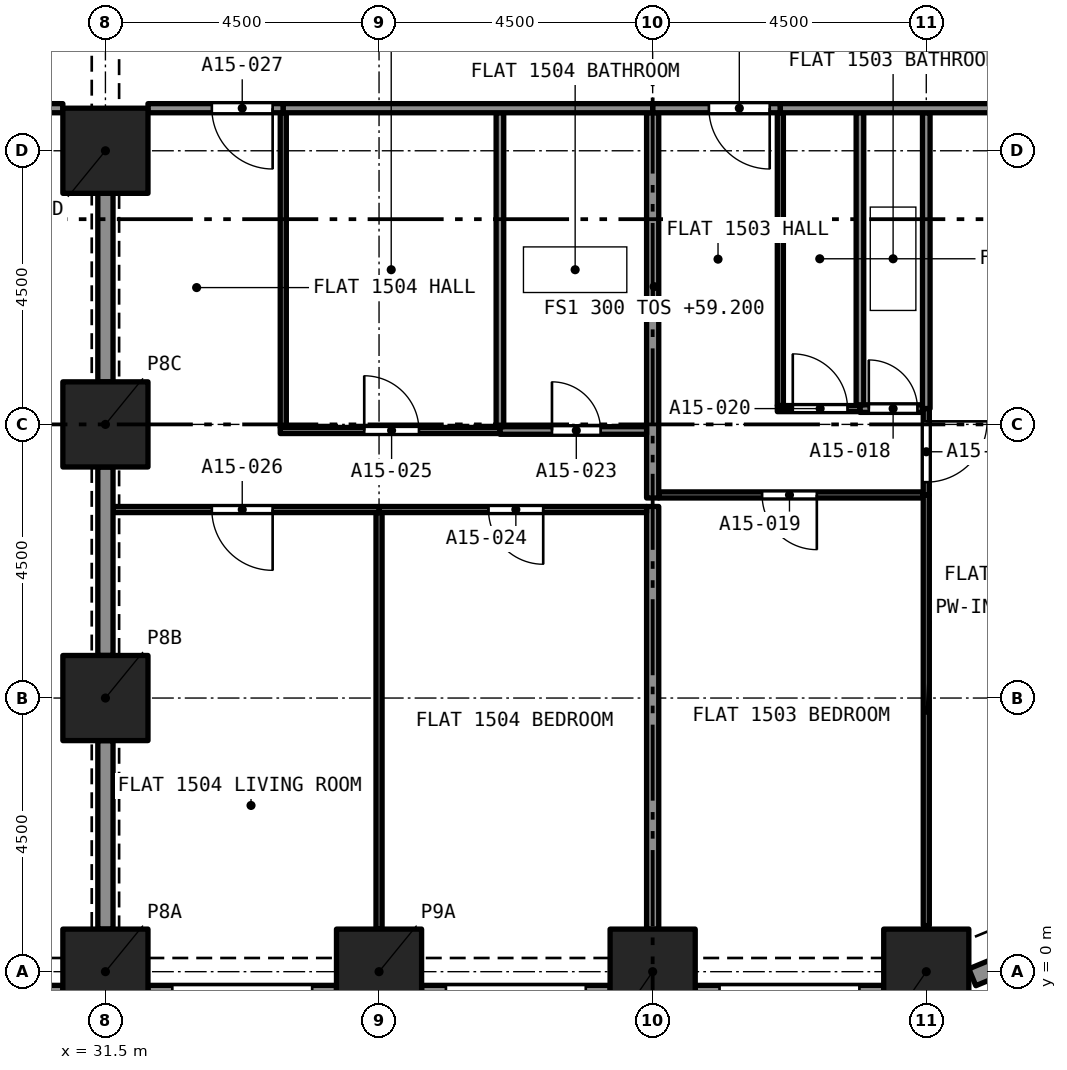
"""IFC4 building model, lengths in metres.
Left out: names, types, materials, properties, quantities, classifications, styles, units other than length and angle.
Written with IfcOpenShell. Run it as: python <this file> out.ifc"""

import sys

from ifc_helpers import new_model, si_unit, direction, frame, frame_2d, origin, origin_2d, place, context, subcontext, project, spatial, rectangle, extrude, element, fill, save


model = new_model("IFC4")
c1 = context("Model", 3, precision=1e-05, world=origin(), true_north=direction((0.0, 1.0)))
c2 = subcontext(c1, "Body", "Model", "MODEL_VIEW")
j1 = project(units=[si_unit("LENGTHUNIT", "METRE"), si_unit("PLANEANGLEUNIT", "RADIAN")], contexts=[c1])
p1 = place(None, origin())
s1 = spatial("IfcSite", under=j1, at=p1, CompositionType="ELEMENT")
p2 = place(p1, origin())
s2 = spatial("IfcBuilding", under=s1, at=p2, CompositionType="ELEMENT")
p3 = place(p2, frame((0.0, 0.0, 59.2)))
s3 = spatial("IfcBuildingStorey", under=s2, at=p3, CompositionType="ELEMENT", Elevation=59.2)
for number, where, z_axis, x_axis in (
    (1, (31.5, 0.0, 0.0), (0.0, 0.0, 1.0), (1.0, 0.0, 0.0)),
    (2, (36.0, 0.0, 0.0), (0.0, 0.0, 1.0), (1.0, 0.0, 0.0)),
    (3, (40.5, 0.0, 0.0), (0.0, 0.0, 1.0), (1.0, 0.0, 0.0)),
    (4, (45.0, 0.0, 0.0), (0.0, 0.0, 1.0), (1.0, 0.0, 0.0)),
    (5, (31.5, 4.5, 0.0), (0.0, 0.0, 1.0), (1.0, 0.0, 0.0)),
    (6, (31.5, 9.0, 0.0), (0.0, 0.0, 1.0), (1.0, 0.0, 0.0)),
    (7, (31.5, 13.5, 0.0), (0.0, 0.0, 1.0), (1.0, 0.0, 0.0)),
):
    element("IfcColumn", number, at=place(p3, frame(where, z_axis=z_axis, x_axis=x_axis)), inside=s3, PredefinedType="COLUMN", context=c2, shape_type="SweptSolid", body=[
        extrude(rectangle(XDim=1.4, YDim=1.4, at=origin_2d()), origin(), (0.0, 0.0, 1.0), 3.2),
    ])
p4 = place(p3, frame((30.8, -0.375, 0.0), z_axis=(0.0, 0.0, 1.0), x_axis=(-1.0, 0.0, 0.0)))
e8 = element("IfcWall", 8, at=p4, inside=s3, PredefinedType="SOLIDWALL", context=c2, shape_type="SweptSolid", body=[
    extrude(rectangle(XDim=3.1, YDim=0.3, at=frame_2d((1.55, 0.0))), origin(), (0.0, 0.0, 1.0), 3.2),
])
p5 = place(p4, frame((0.4, 0.0, 0.45)))
e9 = element("IfcOpeningElement", 9, at=p5, cuts=e8, PredefinedType="OPENING", context=c2, shape_type="SweptSolid", body=[
    extrude(rectangle(XDim=2.3, YDim=1.95, at=frame_2d((1.15, 0.975))), frame((0.0, 0.16, 0.0), z_axis=(0.0, -1.0, 0.0), x_axis=(1.0, 0.0, 0.0)), (0.0, 0.0, 1.0), 0.32),
])
p6 = place(p3, frame((35.3, -0.375, 0.0), z_axis=(0.0, 0.0, 1.0), x_axis=(-1.0, 0.0, 0.0)))
e10 = element("IfcWall", 10, at=p6, inside=s3, PredefinedType="SOLIDWALL", context=c2, shape_type="SweptSolid", body=[
    extrude(rectangle(XDim=3.1, YDim=0.3, at=frame_2d((1.55, 0.0))), origin(), (0.0, 0.0, 1.0), 3.2),
])
p7 = place(p6, frame((0.4, 0.0, 0.45)))
e11 = element("IfcOpeningElement", 11, at=p7, cuts=e10, PredefinedType="OPENING", context=c2, shape_type="SweptSolid", body=[
    extrude(rectangle(XDim=2.3, YDim=1.95, at=frame_2d((1.15, 0.975))), frame((0.0, 0.16, 0.0), z_axis=(0.0, -1.0, 0.0), x_axis=(1.0, 0.0, 0.0)), (0.0, 0.0, 1.0), 0.32),
])
p8 = place(p3, frame((39.8, -0.375, 0.0), z_axis=(0.0, 0.0, 1.0), x_axis=(-1.0, 0.0, 0.0)))
e12 = element("IfcWall", 12, at=p8, inside=s3, PredefinedType="SOLIDWALL", context=c2, shape_type="SweptSolid", body=[
    extrude(rectangle(XDim=3.1, YDim=0.3, at=frame_2d((1.55, 0.0))), origin(), (0.0, 0.0, 1.0), 3.2),
])
p9 = place(p8, frame((0.4, 0.0, 0.45)))
e13 = element("IfcOpeningElement", 13, at=p9, cuts=e12, PredefinedType="OPENING", context=c2, shape_type="SweptSolid", body=[
    extrude(rectangle(XDim=2.3, YDim=1.95, at=frame_2d((1.15, 0.975))), frame((0.0, 0.16, 0.0), z_axis=(0.0, -1.0, 0.0), x_axis=(1.0, 0.0, 0.0)), (0.0, 0.0, 1.0), 0.32),
])
p10 = place(p3, frame((44.3, -0.375, 0.0), z_axis=(0.0, 0.0, 1.0), x_axis=(-1.0, 0.0, 0.0)))
e14 = element("IfcWall", 14, at=p10, inside=s3, PredefinedType="SOLIDWALL", context=c2, shape_type="SweptSolid", body=[
    extrude(rectangle(XDim=3.1, YDim=0.3, at=frame_2d((1.55, 0.0))), origin(), (0.0, 0.0, 1.0), 3.2),
])
p11 = place(p10, frame((0.4, 0.0, 0.45)))
e15 = element("IfcOpeningElement", 15, at=p11, cuts=e14, PredefinedType="OPENING", context=c2, shape_type="SweptSolid", body=[
    extrude(rectangle(XDim=2.3, YDim=1.95, at=frame_2d((1.15, 0.975))), frame((0.0, 0.16, 0.0), z_axis=(0.0, -1.0, 0.0), x_axis=(1.0, 0.0, 0.0)), (0.0, 0.0, 1.0), 0.32),
])
p12 = place(p3, frame((47.48, 0.622, 0.0), z_axis=(0.0, 0.0, 1.0), x_axis=(-0.923903565336, -0.38262540684, 0.0)))
e16 = element("IfcWall", 16, at=p12, inside=s3, PredefinedType="SOLIDWALL", context=c2, shape_type="SweptSolid", body=[
    extrude(rectangle(XDim=1.865, YDim=0.3, at=frame_2d((0.933, 0.0))), origin(), (0.0, 0.0, 1.0), 3.2),
])
p13 = place(p12, frame((0.258, 0.0, 0.45)))
e17 = element("IfcOpeningElement", 17, at=p13, cuts=e16, PredefinedType="OPENING", context=c2, shape_type="SweptSolid", body=[
    extrude(rectangle(XDim=1.1, YDim=1.95, at=frame_2d((0.55, 0.975))), frame((0.0, 0.16, 0.0), z_axis=(0.0, -1.0, 0.0), x_axis=(1.0, 0.0, 0.0)), (0.0, 0.0, 1.0), 0.32),
])
p14 = place(p3, frame((43.909, 9.26, 0.0), z_axis=(0.0, 0.0, 1.0), x_axis=(1.0, 0.0, 0.0)))
e18 = element("IfcWall", 18, at=p14, inside=s3, PredefinedType="PARTITIONING", context=c2, shape_type="SweptSolid", body=[
    extrude(rectangle(XDim=1.028, YDim=0.125, at=frame_2d((0.514, 0.0))), origin(), (0.0, 0.0, 1.0), 2.9),
])
p15 = place(p14, frame((0.146, 0.0, 0.0)))
e19 = element("IfcOpeningElement", 19, at=p15, cuts=e18, PredefinedType="OPENING", context=c2, shape_type="SweptSolid", body=[
    extrude(rectangle(XDim=0.8, YDim=2.1, at=frame_2d((0.4, 1.05))), frame((0.0, 0.073, 0.0), z_axis=(0.0, -1.0, 0.0), x_axis=(1.0, 0.0, 0.0)), (0.0, 0.0, 1.0), 0.145),
])
p16 = place(p3, frame((43.909, 9.323, 0.0), z_axis=(0.0, 0.0, 1.0), x_axis=(0.0, 1.0, 0.0)))
e20 = element("IfcWall", 20, at=p16, inside=s3, PredefinedType="PARTITIONING", context=c2, shape_type="SweptSolid", body=[
    extrude(rectangle(XDim=4.802, YDim=0.125, at=frame_2d((2.401, 0.0))), origin(), (0.0, 0.0, 1.0), 2.9),
])
p17 = place(p3, frame((45.0, 9.26, 0.0), z_axis=(0.0, 0.0, 1.0), x_axis=(0.0, 1.0, 0.0)))
e21 = element("IfcWall", 21, at=p17, inside=s3, PredefinedType="PARTITIONING", context=c2, shape_type="SweptSolid", body=[
    extrude(rectangle(XDim=4.865, YDim=0.125, at=frame_2d((2.433, 0.0))), origin(), (0.0, 0.0, 1.0), 2.9),
])
p18 = place(p3, frame((44.95, 7.84, 0.0), z_axis=(0.0, 0.0, 1.0), x_axis=(-1.0, 0.0, 0.0)))
e22 = element("IfcWall", 22, at=p18, inside=s3, PredefinedType="PARTITIONING", context=c2, shape_type="SweptSolid", body=[
    extrude(rectangle(XDim=4.35, YDim=0.1, at=frame_2d((2.175, 0.0))), origin(), (0.0, 0.0, 1.0), 2.9),
])
p19 = place(p18, frame((1.75, 0.0, 0.0)))
e23 = element("IfcOpeningElement", 23, at=p19, cuts=e22, PredefinedType="OPENING", context=c2, shape_type="SweptSolid", body=[
    extrude(rectangle(XDim=0.9, YDim=2.1, at=frame_2d((0.45, 1.05))), frame((0.0, 0.06, 0.0), z_axis=(0.0, -1.0, 0.0), x_axis=(1.0, 0.0, 0.0)), (0.0, 0.0, 1.0), 0.12),
])
p20 = place(p3, frame((45.0, 0.758, 0.0), z_axis=(0.0, 0.0, 1.0), x_axis=(0.0, 1.0, 0.0)))
e24 = element("IfcWall", 24, at=p20, inside=s3, PredefinedType="PARTITIONING", context=c2, shape_type="SweptSolid", body=[
    extrude(rectangle(XDim=7.083, YDim=0.1, at=frame_2d((3.541, 0.0))), origin(), (0.0, 0.0, 1.0), 2.9),
])
p21 = place(p3, frame((40.5, 0.7, 0.0), z_axis=(0.0, 0.0, 1.0), x_axis=(0.0, 1.0, 0.0)))
e25 = element("IfcWall", 25, at=p21, inside=s3, PredefinedType="PARTITIONING", context=c2, shape_type="SweptSolid", body=[
    extrude(rectangle(XDim=6.95, YDim=0.2, at=frame_2d((3.475, 0.0))), origin(), (0.0, 0.0, 1.0), 2.9),
])
p22 = place(p3, frame((42.6, 9.31, 0.0), z_axis=(0.0, 0.0, 1.0), x_axis=(0.0, 1.0, 0.0)))
e26 = element("IfcWall", 26, at=p22, inside=s3, PredefinedType="PARTITIONING", context=c2, shape_type="SweptSolid", body=[
    extrude(rectangle(XDim=4.815, YDim=0.1, at=frame_2d((2.407, 0.0))), origin(), (0.0, 0.0, 1.0), 2.9),
])
p23 = place(p3, frame((42.55, 9.26, 0.0), z_axis=(0.0, 0.0, 1.0), x_axis=(1.0, 0.0, 0.0)))
e27 = element("IfcWall", 27, at=p23, inside=s3, PredefinedType="PARTITIONING", context=c2, shape_type="SweptSolid", body=[
    extrude(rectangle(XDim=1.359, YDim=0.1, at=frame_2d((0.68, 0.0))), origin(), (0.0, 0.0, 1.0), 2.9),
])
p24 = place(p23, frame((0.254, 0.0, 0.0)))
e28 = element("IfcOpeningElement", 28, at=p24, cuts=e27, PredefinedType="OPENING", context=c2, shape_type="SweptSolid", body=[
    extrude(rectangle(XDim=0.9, YDim=2.1, at=frame_2d((0.45, 1.05))), frame((0.0, 0.06, 0.0), z_axis=(0.0, -1.0, 0.0), x_axis=(1.0, 0.0, 0.0)), (0.0, 0.0, 1.0), 0.12),
])
p25 = place(p3, frame((45.0, 9.26, 0.0), z_axis=(0.0, 0.0, 1.0), x_axis=(0.0, -1.0, 0.0)))
e29 = element("IfcWall", 29, at=p25, inside=s3, PredefinedType="PARTITIONING", context=c2, shape_type="SweptSolid", body=[
    extrude(rectangle(XDim=1.42, YDim=0.1, at=frame_2d((0.71, 0.0))), origin(), (0.0, 0.0, 1.0), 2.9),
])
p26 = place(p25, frame((0.21, 0.0, 0.0)))
e30 = element("IfcOpeningElement", 30, at=p26, cuts=e29, PredefinedType="OPENING", context=c2, shape_type="SweptSolid", body=[
    extrude(rectangle(XDim=1.0, YDim=2.1, at=frame_2d((0.5, 1.05))), frame((0.0, 0.06, 0.0), z_axis=(0.0, -1.0, 0.0), x_axis=(1.0, 0.0, 0.0)), (0.0, 0.0, 1.0), 0.12),
])
p27 = place(p3, frame((40.5, 7.79, 0.0), z_axis=(0.0, 0.0, 1.0), x_axis=(0.0, 1.0, 0.0)))
e31 = element("IfcWall", 31, at=p27, inside=s3, PredefinedType="PARTITIONING", context=c2, shape_type="SweptSolid", body=[
    extrude(rectangle(XDim=6.335, YDim=0.2, at=frame_2d((3.167, 0.0))), origin(), (0.0, 0.0, 1.0), 2.9),
])
p28 = place(p3, frame((42.6, 14.2, 0.0), z_axis=(0.0, 0.0, 1.0), x_axis=(-1.0, 0.0, 0.0)))
e32 = element("IfcWall", 32, at=p28, inside=s3, PredefinedType="PARTITIONING", context=c2, shape_type="SweptSolid", body=[
    extrude(rectangle(XDim=2.1, YDim=0.15, at=frame_2d((1.05, 0.0))), origin(), (0.0, 0.0, 1.0), 2.9),
])
p29 = place(p28, frame((0.175, 0.0, 0.0)))
e33 = element("IfcOpeningElement", 33, at=p29, cuts=e32, PredefinedType="OPENING", context=c2, shape_type="SweptSolid", body=[
    extrude(rectangle(XDim=1.0, YDim=2.1, at=frame_2d((0.5, 1.05))), frame((0.0, 0.085, 0.0), z_axis=(0.0, -1.0, 0.0), x_axis=(1.0, 0.0, 0.0)), (0.0, 0.0, 1.0), 0.17),
])
p30 = place(p3, frame((42.6, 14.2, 0.0), z_axis=(0.0, 0.0, 1.0), x_axis=(1.0, 0.0, 0.0)))
e34 = element("IfcWall", 34, at=p30, inside=s3, PredefinedType="PARTITIONING", context=c2, shape_type="SweptSolid", body=[
    extrude(rectangle(XDim=6.2, YDim=0.15, at=frame_2d((3.1, 0.0))), origin(), (0.0, 0.0, 1.0), 2.9),
])
p31 = place(p3, frame((37.988, 8.9, 0.0), z_axis=(0.0, 0.0, 1.0), x_axis=(1.0, 0.0, 0.0)))
e35 = element("IfcWall", 35, at=p31, inside=s3, PredefinedType="PARTITIONING", context=c2, shape_type="SweptSolid", body=[
    extrude(rectangle(XDim=2.412, YDim=0.125, at=frame_2d((1.206, 0.0))), origin(), (0.0, 0.0, 1.0), 2.9),
])
p32 = place(p31, frame((0.856, 0.0, 0.0)))
e36 = element("IfcOpeningElement", 36, at=p32, cuts=e35, PredefinedType="OPENING", context=c2, shape_type="SweptSolid", body=[
    extrude(rectangle(XDim=0.8, YDim=2.1, at=frame_2d((0.4, 1.05))), frame((0.0, 0.073, 0.0), z_axis=(0.0, -1.0, 0.0), x_axis=(1.0, 0.0, 0.0)), (0.0, 0.0, 1.0), 0.145),
])
p33 = place(p3, frame((37.988, 8.962, 0.0), z_axis=(0.0, 0.0, 1.0), x_axis=(0.0, 1.0, 0.0)))
e37 = element("IfcWall", 37, at=p33, inside=s3, PredefinedType="PARTITIONING", context=c2, shape_type="SweptSolid", body=[
    extrude(rectangle(XDim=5.163, YDim=0.125, at=frame_2d((2.581, 0.0))), origin(), (0.0, 0.0, 1.0), 2.9),
])
p34 = place(p3, frame((40.4, 7.6, 0.0), z_axis=(0.0, 0.0, 1.0), x_axis=(-1.0, 0.0, 0.0)))
e38 = element("IfcWall", 38, at=p34, inside=s3, PredefinedType="PARTITIONING", context=c2, shape_type="SweptSolid", body=[
    extrude(rectangle(XDim=4.4, YDim=0.1, at=frame_2d((2.2, 0.0))), origin(), (0.0, 0.0, 1.0), 2.9),
])
p35 = place(p34, frame((1.7, 0.0, 0.0)))
e39 = element("IfcOpeningElement", 39, at=p35, cuts=e38, PredefinedType="OPENING", context=c2, shape_type="SweptSolid", body=[
    extrude(rectangle(XDim=0.9, YDim=2.1, at=frame_2d((0.45, 1.05))), frame((0.0, 0.06, 0.0), z_axis=(0.0, -1.0, 0.0), x_axis=(1.0, 0.0, 0.0)), (0.0, 0.0, 1.0), 0.12),
])
p36 = place(p3, frame((36.0, 0.7, 0.0), z_axis=(0.0, 0.0, 1.0), x_axis=(0.0, 1.0, 0.0)))
e40 = element("IfcWall", 40, at=p36, inside=s3, PredefinedType="PARTITIONING", context=c2, shape_type="SweptSolid", body=[
    extrude(rectangle(XDim=6.85, YDim=0.1, at=frame_2d((3.425, 0.0))), origin(), (0.0, 0.0, 1.0), 2.9),
])
p37 = place(p3, frame((34.425, 8.95, 0.0), z_axis=(0.0, 0.0, 1.0), x_axis=(0.0, 1.0, 0.0)))
e41 = element("IfcWall", 41, at=p37, inside=s3, PredefinedType="PARTITIONING", context=c2, shape_type="SweptSolid", body=[
    extrude(rectangle(XDim=5.175, YDim=0.1, at=frame_2d((2.587, 0.0))), origin(), (0.0, 0.0, 1.0), 2.9),
])
p38 = place(p3, frame((34.375, 8.9, 0.0), z_axis=(0.0, 0.0, 1.0), x_axis=(1.0, 0.0, 0.0)))
e42 = element("IfcWall", 42, at=p38, inside=s3, PredefinedType="PARTITIONING", context=c2, shape_type="SweptSolid", body=[
    extrude(rectangle(XDim=3.613, YDim=0.1, at=frame_2d((1.807, 0.0))), origin(), (0.0, 0.0, 1.0), 2.9),
])
p39 = place(p38, frame((1.382, 0.0, 0.0)))
e43 = element("IfcOpeningElement", 43, at=p39, cuts=e42, PredefinedType="OPENING", context=c2, shape_type="SweptSolid", body=[
    extrude(rectangle(XDim=0.9, YDim=2.1, at=frame_2d((0.45, 1.05))), frame((0.0, 0.06, 0.0), z_axis=(0.0, -1.0, 0.0), x_axis=(1.0, 0.0, 0.0)), (0.0, 0.0, 1.0), 0.12),
])
p40 = place(p3, frame((36.0, 7.6, 0.0), z_axis=(0.0, 0.0, 1.0), x_axis=(-1.0, 0.0, 0.0)))
e44 = element("IfcWall", 44, at=p40, inside=s3, PredefinedType="PARTITIONING", context=c2, shape_type="SweptSolid", body=[
    extrude(rectangle(XDim=4.375, YDim=0.1, at=frame_2d((2.188, 0.0))), origin(), (0.0, 0.0, 1.0), 2.9),
])
p41 = place(p40, frame((1.75, 0.0, 0.0)))
e45 = element("IfcOpeningElement", 45, at=p41, cuts=e44, PredefinedType="OPENING", context=c2, shape_type="SweptSolid", body=[
    extrude(rectangle(XDim=1.0, YDim=2.1, at=frame_2d((0.5, 1.05))), frame((0.0, 0.06, 0.0), z_axis=(0.0, -1.0, 0.0), x_axis=(1.0, 0.0, 0.0)), (0.0, 0.0, 1.0), 0.12),
])
p42 = place(p3, frame((31.5, 9.7, 0.0), z_axis=(0.0, 0.0, 1.0), x_axis=(0.0, 1.0, 0.0)))
e46 = element("IfcWall", 46, at=p42, inside=s3, PredefinedType="PARTITIONING", context=c2, shape_type="SweptSolid", body=[
    extrude(rectangle(XDim=3.1, YDim=0.25, at=frame_2d((1.55, 0.0))), origin(), (0.0, 0.0, 1.0), 2.38),
])
p43 = place(p3, frame((34.425, 14.2, 0.0), z_axis=(0.0, 0.0, 1.0), x_axis=(-1.0, 0.0, 0.0)))
e47 = element("IfcWall", 47, at=p43, inside=s3, PredefinedType="PARTITIONING", context=c2, shape_type="SweptSolid", body=[
    extrude(rectangle(XDim=2.225, YDim=0.15, at=frame_2d((1.113, 0.0))), origin(), (0.0, 0.0, 1.0), 2.9),
])
p44 = place(p43, frame((0.175, 0.0, 0.0)))
e48 = element("IfcOpeningElement", 48, at=p44, cuts=e47, PredefinedType="OPENING", context=c2, shape_type="SweptSolid", body=[
    extrude(rectangle(XDim=1.0, YDim=2.1, at=frame_2d((0.5, 1.05))), frame((0.0, 0.085, 0.0), z_axis=(0.0, -1.0, 0.0), x_axis=(1.0, 0.0, 0.0)), (0.0, 0.0, 1.0), 0.17),
])
p45 = place(p3, frame((34.425, 14.2, 0.0), z_axis=(0.0, 0.0, 1.0), x_axis=(1.0, 0.0, 0.0)))
e49 = element("IfcWall", 49, at=p45, inside=s3, PredefinedType="PARTITIONING", context=c2, shape_type="SweptSolid", body=[
    extrude(rectangle(XDim=6.075, YDim=0.15, at=frame_2d((3.038, 0.0))), origin(), (0.0, 0.0, 1.0), 2.9),
])
for number, where, z_axis, x_axis in (
    (50, (31.5, 0.7, 0.0), (0.0, 0.0, 1.0), (0.0, 1.0, 0.0)),
    (51, (31.5, 5.2, 0.0), (0.0, 0.0, 1.0), (0.0, 1.0, 0.0)),
):
    element("IfcWall", number, at=place(p3, frame(where, z_axis=z_axis, x_axis=x_axis)), inside=s3, PredefinedType="PARTITIONING", context=c2, shape_type="SweptSolid", body=[
        extrude(rectangle(XDim=3.1, YDim=0.25, at=frame_2d((1.55, 0.0))), origin(), (0.0, 0.0, 1.0), 2.38),
    ])
p46 = place(p3, frame((30.8, 14.2, 0.0), z_axis=(0.0, 0.0, 1.0), x_axis=(-1.0, 0.0, 0.0)))
e52 = element("IfcWall", 52, at=p46, inside=s3, PredefinedType="PARTITIONING", context=c2, shape_type="SweptSolid", body=[
    extrude(rectangle(XDim=8.3, YDim=0.15, at=frame_2d((4.15, 0.0))), origin(), (0.0, 0.0, 1.0), 2.75),
])
p47 = place(p46, frame((3.3, 0.0, 0.0)))
e53 = element("IfcOpeningElement", 53, at=p47, cuts=e52, PredefinedType="OPENING", context=c2, shape_type="SweptSolid", body=[
    extrude(rectangle(XDim=1.0, YDim=2.1, at=frame_2d((0.5, 1.05))), frame((0.0, 0.085, 0.0), z_axis=(0.0, -1.0, 0.0), x_axis=(1.0, 0.0, 0.0)), (0.0, 0.0, 1.0), 0.17),
])
p48 = place(p15, origin())
e54 = element("IfcDoor", 54, at=p48, inside=s3, OperationType="SINGLE_SWING_RIGHT", PredefinedType="DOOR", context=c2, shape_type="SweptSolid", body=[
    extrude(rectangle(XDim=0.8, YDim=2.1, at=frame_2d((0.4, 1.05))), frame((0.0, 0.025, 0.0), z_axis=(0.0, -1.0, 0.0), x_axis=(1.0, 0.0, 0.0)), (0.0, 0.0, 1.0), 0.05),
])
fill(e19, e54)
p49 = place(p19, origin())
e55 = element("IfcDoor", 55, at=p49, inside=s3, OperationType="SINGLE_SWING_RIGHT", PredefinedType="DOOR", context=c2, shape_type="SweptSolid", body=[
    extrude(rectangle(XDim=0.9, YDim=2.1, at=frame_2d((0.45, 1.05))), frame((0.0, 0.025, 0.0), z_axis=(0.0, -1.0, 0.0), x_axis=(1.0, 0.0, 0.0)), (0.0, 0.0, 1.0), 0.05),
])
fill(e23, e55)
p50 = place(p24, origin())
e56 = element("IfcDoor", 56, at=p50, inside=s3, OperationType="SINGLE_SWING_RIGHT", PredefinedType="DOOR", context=c2, shape_type="SweptSolid", body=[
    extrude(rectangle(XDim=0.9, YDim=2.1, at=frame_2d((0.45, 1.05))), frame((0.0, 0.025, 0.0), z_axis=(0.0, -1.0, 0.0), x_axis=(1.0, 0.0, 0.0)), (0.0, 0.0, 1.0), 0.05),
])
fill(e28, e56)
p51 = place(p26, origin())
e57 = element("IfcDoor", 57, at=p51, inside=s3, OperationType="SINGLE_SWING_RIGHT", PredefinedType="DOOR", context=c2, shape_type="SweptSolid", body=[
    extrude(rectangle(XDim=1.0, YDim=2.1, at=frame_2d((0.5, 1.05))), frame((0.0, 0.025, 0.0), z_axis=(0.0, -1.0, 0.0), x_axis=(1.0, 0.0, 0.0)), (0.0, 0.0, 1.0), 0.05),
])
fill(e30, e57)
p52 = place(p29, origin())
e58 = element("IfcDoor", 58, at=p52, inside=s3, OperationType="SINGLE_SWING_LEFT", PredefinedType="DOOR", context=c2, shape_type="SweptSolid", body=[
    extrude(rectangle(XDim=1.0, YDim=2.1, at=frame_2d((0.5, 1.05))), frame((0.0, 0.025, 0.0), z_axis=(0.0, -1.0, 0.0), x_axis=(1.0, 0.0, 0.0)), (0.0, 0.0, 1.0), 0.05),
])
fill(e33, e58)
p53 = place(p32, origin())
e59 = element("IfcDoor", 59, at=p53, inside=s3, OperationType="SINGLE_SWING_RIGHT", PredefinedType="DOOR", context=c2, shape_type="SweptSolid", body=[
    extrude(rectangle(XDim=0.8, YDim=2.1, at=frame_2d((0.4, 1.05))), frame((0.0, 0.025, 0.0), z_axis=(0.0, -1.0, 0.0), x_axis=(1.0, 0.0, 0.0)), (0.0, 0.0, 1.0), 0.05),
])
fill(e36, e59)
p54 = place(p35, origin())
e60 = element("IfcDoor", 60, at=p54, inside=s3, OperationType="SINGLE_SWING_LEFT", PredefinedType="DOOR", context=c2, shape_type="SweptSolid", body=[
    extrude(rectangle(XDim=0.9, YDim=2.1, at=frame_2d((0.45, 1.05))), frame((0.0, 0.025, 0.0), z_axis=(0.0, -1.0, 0.0), x_axis=(1.0, 0.0, 0.0)), (0.0, 0.0, 1.0), 0.05),
])
fill(e39, e60)
p55 = place(p39, origin())
e61 = element("IfcDoor", 61, at=p55, inside=s3, OperationType="SINGLE_SWING_RIGHT", PredefinedType="DOOR", context=c2, shape_type="SweptSolid", body=[
    extrude(rectangle(XDim=0.9, YDim=2.1, at=frame_2d((0.45, 1.05))), frame((0.0, 0.025, 0.0), z_axis=(0.0, -1.0, 0.0), x_axis=(1.0, 0.0, 0.0)), (0.0, 0.0, 1.0), 0.05),
])
fill(e43, e61)
p56 = place(p41, origin())
e62 = element("IfcDoor", 62, at=p56, inside=s3, OperationType="SINGLE_SWING_RIGHT", PredefinedType="DOOR", context=c2, shape_type="SweptSolid", body=[
    extrude(rectangle(XDim=1.0, YDim=2.1, at=frame_2d((0.5, 1.05))), frame((0.0, 0.025, 0.0), z_axis=(0.0, -1.0, 0.0), x_axis=(1.0, 0.0, 0.0)), (0.0, 0.0, 1.0), 0.05),
])
fill(e45, e62)
p57 = place(p44, origin())
e63 = element("IfcDoor", 63, at=p57, inside=s3, OperationType="SINGLE_SWING_LEFT", PredefinedType="DOOR", context=c2, shape_type="SweptSolid", body=[
    extrude(rectangle(XDim=1.0, YDim=2.1, at=frame_2d((0.5, 1.05))), frame((0.0, 0.025, 0.0), z_axis=(0.0, -1.0, 0.0), x_axis=(1.0, 0.0, 0.0)), (0.0, 0.0, 1.0), 0.05),
])
fill(e48, e63)
save(model, sys.argv[1])
